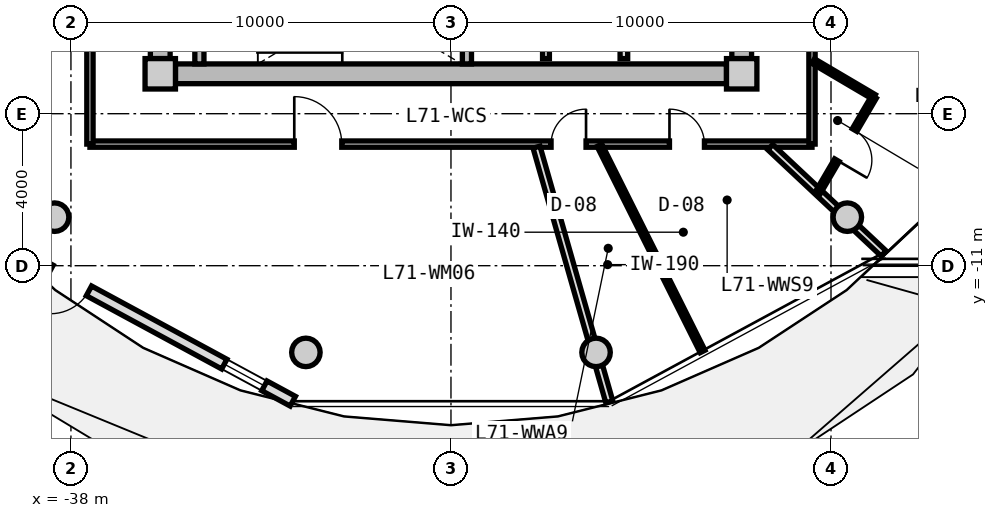
"""IFC4 building model, lengths in metres.
Left out: names, types, materials, properties, quantities, classifications, styles, units other than length and angle.
Written with IfcOpenShell. Run it as: python <this file> out.ifc"""

import sys

from ifc_helpers import new_model, si_unit, direction, frame, frame_2d, origin, origin_2d, place, context, subcontext, project, spatial, rectangle, circle, extrude, source, transform, mapped, element, fill, save


model = new_model("IFC4")
c1 = context("Model", 3, precision=1e-05, world=origin(), true_north=direction((0.0, 1.0)))
c2 = subcontext(c1, "Body", "Model", "MODEL_VIEW")
j1 = project(units=[si_unit("LENGTHUNIT", "METRE"), si_unit("PLANEANGLEUNIT", "RADIAN")], contexts=[c1])
p1 = place(None, origin())
s1 = spatial("IfcSite", under=j1, at=p1, CompositionType="ELEMENT")
p2 = place(p1, origin())
s2 = spatial("IfcBuilding", under=s1, at=p2, CompositionType="ELEMENT")
p3 = place(p2, frame((0.0, 0.0, 229.15)))
s3 = spatial("IfcBuildingStorey", under=s2, at=p3, CompositionType="ELEMENT", Elevation=229.15)
m1 = source(origin(), c2, "Body", "SweptSolid", [
    extrude(rectangle(XDim=0.8, YDim=0.8, at=origin_2d()), origin(), (0.0, 0.0, 1.0), 3.05),
])
for number, where, z_axis, x_axis in (
    (1, (-35.65, -5.95, 0.0), (0.0, 0.0, 1.0), (1.0, 0.0, 0.0)),
    (2, (-20.35, -5.95, 0.0), (0.0, 0.0, 1.0), (1.0, 0.0, 0.0)),
):
    element("IfcColumn", number, at=place(p3, frame(where, z_axis=z_axis, x_axis=x_axis)), inside=s3, PredefinedType="COLUMN", context=c2, shape_type="MappedRepresentation", body=[
        mapped(m1, transform((0.0, 0.0, 0.0), x_axis=(1.0, 0.0, 0.0), y_axis=(0.0, 1.0, 0.0), z_axis=(0.0, 0.0, 1.0), scale=1.0)),
    ])
m2 = source(origin(), c2, "Body", "SweptSolid", [
    extrude(rectangle(XDim=14.5, YDim=0.52, at=frame_2d((7.25, 0.0))), origin(), (0.0, 0.0, 1.0), 2.81),
])
p4 = place(p3, frame((-20.75, -5.95, 0.0), z_axis=(0.0, 0.0, 1.0), x_axis=(-1.0, 0.0, 0.0)))
e3 = element("IfcWall", 3, at=p4, inside=s3, PredefinedType="SHEAR", context=c2, shape_type="MappedRepresentation", body=[
    mapped(m2, transform((0.0, 0.0, 0.0), x_axis=(1.0, 0.0, 0.0), y_axis=(0.0, 1.0, 0.0), z_axis=(0.0, 0.0, 1.0), scale=1.0)),
])
m3 = source(origin(), c2, "Body", "SweptSolid", [
    extrude(rectangle(XDim=11.1, YDim=0.52, at=frame_2d((5.55, 0.0))), origin(), (0.0, 0.0, 1.0), 2.81),
])
p5 = place(p3, frame((-35.65, -5.55, 0.0), z_axis=(0.0, 0.0, 1.0), x_axis=(0.0, 1.0, 0.0)))
e4 = element("IfcWall", 4, at=p5, inside=s3, PredefinedType="SHEAR", context=c2, shape_type="MappedRepresentation", body=[
    mapped(m3, transform((0.0, 0.0, 0.0), x_axis=(1.0, 0.0, 0.0), y_axis=(0.0, 1.0, 0.0), z_axis=(0.0, 0.0, 1.0), scale=1.0)),
])
p6 = place(p5, frame((3.8, 0.0, 0.0)))
e5 = element("IfcOpeningElement", 5, at=p6, cuts=e4, PredefinedType="OPENING", context=c2, shape_type="SweptSolid", body=[
    extrude(rectangle(XDim=1.2, YDim=2.15, at=frame_2d((0.6, 1.075))), frame((0.0, 0.27, 0.0), z_axis=(0.0, -1.0, 0.0), x_axis=(1.0, 0.0, 0.0)), (0.0, 0.0, 1.0), 0.54),
])
p7 = place(p3, frame((-20.35, 5.55, 0.0), z_axis=(0.0, 0.0, 1.0), x_axis=(0.0, -1.0, 0.0)))
e6 = element("IfcWall", 6, at=p7, inside=s3, PredefinedType="SHEAR", context=c2, shape_type="MappedRepresentation", body=[
    mapped(m3, transform((0.0, 0.0, 0.0), x_axis=(1.0, 0.0, 0.0), y_axis=(0.0, 1.0, 0.0), z_axis=(0.0, 0.0, 1.0), scale=1.0)),
])
p8 = place(p7, frame((5.65, 0.0, 0.0)))
e7 = element("IfcOpeningElement", 7, at=p8, cuts=e6, PredefinedType="OPENING", context=c2, shape_type="SweptSolid", body=[
    extrude(rectangle(XDim=1.2, YDim=2.15, at=frame_2d((0.6, 1.075))), frame((0.0, 0.27, 0.0), z_axis=(0.0, -1.0, 0.0), x_axis=(1.0, 0.0, 0.0)), (0.0, 0.0, 1.0), 0.54),
])
p9 = place(p7, frame((9.3, 0.0, 0.0)))
e8 = element("IfcOpeningElement", 8, at=p9, cuts=e6, PredefinedType="OPENING", context=c2, shape_type="SweptSolid", body=[
    extrude(rectangle(XDim=1.0, YDim=2.1, at=frame_2d((0.5, 1.05))), frame((0.0, 0.27, 0.0), z_axis=(0.0, -1.0, 0.0), x_axis=(1.0, 0.0, 0.0)), (0.0, 0.0, 1.0), 0.54),
])
m4 = source(origin(), c2, "Body", "SweptSolid", [
    extrude(circle(Radius=0.375, at=origin_2d()), origin(), (0.0, 0.0, 1.0), 3.05),
])
for number, where, z_axis, x_axis in (
    (9, (-38.43, -9.723, 0.0), (0.0, 0.0, 1.0), (1.0, 0.0, 0.0)),
    (10, (-31.818, -13.281, 0.0), (0.0, 0.0, 1.0), (1.0, 0.0, 0.0)),
    (11, (-24.182, -13.281, 0.0), (0.0, 0.0, 1.0), (1.0, 0.0, 0.0)),
    (12, (-17.57, -9.723, 0.0), (0.0, 0.0, 1.0), (1.0, 0.0, 0.0)),
):
    element("IfcColumn", number, at=place(p3, frame(where, z_axis=z_axis, x_axis=x_axis)), inside=s3, PredefinedType="COLUMN", context=c2, shape_type="MappedRepresentation", body=[
        mapped(m4, transform((0.0, 0.0, 0.0), x_axis=(1.0, 0.0, 0.0), y_axis=(0.0, 1.0, 0.0), z_axis=(0.0, 0.0, 1.0), scale=1.0)),
    ])
m5 = source(origin(), c2, "Body", "SweptSolid", [
    extrude(rectangle(XDim=8.197, YDim=0.29, at=frame_2d((4.099, 0.0))), origin(), (0.0, 0.0, 1.0), 2.81),
])
p10 = place(p3, frame((-32.162, -14.566, 0.0), z_axis=(0.0, 0.0, 1.0), x_axis=(-0.879369910001, 0.476139224791, 0.0)))
e13 = element("IfcWall", 13, at=p10, inside=s3, PredefinedType="SOLIDWALL", context=c2, shape_type="MappedRepresentation", body=[
    mapped(m5, transform((0.0, 0.0, 0.0), x_axis=(1.0, 0.0, 0.0), y_axis=(0.0, 1.0, 0.0), z_axis=(0.0, 0.0, 1.0), scale=1.0)),
])
p11 = place(p10, frame((6.1, 0.0, 0.0)))
e14 = element("IfcOpeningElement", 14, at=p11, cuts=e13, PredefinedType="OPENING", context=c2, shape_type="SweptSolid", body=[
    extrude(rectangle(XDim=1.15, YDim=2.25, at=frame_2d((0.575, 1.125))), frame((0.0, 0.155, 0.0), z_axis=(0.0, -1.0, 0.0), x_axis=(1.0, 0.0, 0.0)), (0.0, 0.0, 1.0), 0.31),
])
p12 = place(p10, frame((0.85, 0.0, 0.85)))
e15 = element("IfcOpeningElement", 15, at=p12, cuts=e13, PredefinedType="OPENING", context=c2, shape_type="SweptSolid", body=[
    extrude(rectangle(XDim=1.2, YDim=1.5, at=frame_2d((0.6, 0.75))), frame((0.0, 0.155, 0.0), z_axis=(0.0, -1.0, 0.0), x_axis=(1.0, 0.0, 0.0)), (0.0, 0.0, 1.0), 0.31),
])
m6 = source(origin(), c2, "Body", "SweptSolid", [
    extrude(rectangle(XDim=3.24, YDim=0.24, at=frame_2d((1.62, 0.0))), origin(), (0.0, 0.0, 1.0), 2.81),
])
for number, where, z_axis, x_axis in (
    (16, (-34.62, -5.69, 0.0), (0.0, 0.0, 1.0), (0.0, 1.0, 0.0)),
    (17, (-27.58, -5.69, 0.0), (0.0, 0.0, 1.0), (0.0, 1.0, 0.0)),
):
    element("IfcWall", number, at=place(p3, frame(where, z_axis=z_axis, x_axis=x_axis)), inside=s3, PredefinedType="PARTITIONING", context=c2, shape_type="MappedRepresentation", body=[
        mapped(m6, transform((0.0, 0.0, 0.0), x_axis=(1.0, 0.0, 0.0), y_axis=(0.0, 1.0, 0.0), z_axis=(0.0, 0.0, 1.0), scale=1.0)),
    ])
m7 = source(origin(), c2, "Body", "SweptSolid", [
    extrude(rectangle(XDim=3.8, YDim=0.2, at=frame_2d((1.9, 0.0))), origin(), (0.0, 0.0, 1.0), 2.795),
])
p13 = place(p3, frame((-23.45, -5.55, 0.0), z_axis=(0.0, 0.0, 1.0), x_axis=(0.0, 1.0, 0.0)))
e18 = element("IfcWall", 18, at=p13, inside=s3, PredefinedType="PARTITIONING", context=c2, shape_type="MappedRepresentation", body=[
    mapped(m7, transform((0.0, 0.0, 0.0), x_axis=(1.0, 0.0, 0.0), y_axis=(0.0, 1.0, 0.0), z_axis=(0.0, 0.0, 1.0), scale=1.0)),
])
m8 = source(origin(), c2, "Body", "SweptSolid", [
    extrude(rectangle(XDim=4.2, YDim=0.18, at=frame_2d((2.1, 0.0))), origin(), (0.0, 0.0, 1.0), 2.795),
])
p14 = place(p3, frame((-25.5, -5.55, 0.0), z_axis=(0.0, 0.0, 1.0), x_axis=(0.0, 1.0, 0.0)))
e19 = element("IfcWall", 19, at=p14, inside=s3, PredefinedType="PARTITIONING", context=c2, shape_type="MappedRepresentation", body=[
    mapped(m8, transform((0.0, 0.0, 0.0), x_axis=(1.0, 0.0, 0.0), y_axis=(0.0, 1.0, 0.0), z_axis=(0.0, 0.0, 1.0), scale=1.0)),
])
m9 = source(origin(), c2, "Body", "SweptSolid", [
    extrude(rectangle(XDim=19.0, YDim=0.165, at=frame_2d((9.5, 0.0))), origin(), (0.0, 0.0, 1.0), 2.795),
])
p15 = place(p3, frame((-18.5, -7.8, 0.0), z_axis=(0.0, 0.0, 1.0), x_axis=(-1.0, 0.0, 0.0)))
e20 = element("IfcWall", 20, at=p15, inside=s3, PredefinedType="PARTITIONING", context=c2, shape_type="MappedRepresentation", body=[
    mapped(m9, transform((0.0, 0.0, 0.0), x_axis=(1.0, 0.0, 0.0), y_axis=(0.0, 1.0, 0.0), z_axis=(0.0, 0.0, 1.0), scale=1.0)),
])
p16 = place(p15, frame((12.373, 0.0, 0.0)))
e21 = element("IfcOpeningElement", 21, at=p16, cuts=e20, PredefinedType="OPENING", context=c2, shape_type="SweptSolid", body=[
    extrude(rectangle(XDim=1.25, YDim=2.2, at=frame_2d((0.625, 1.1))), frame((0.0, 0.093, 0.0), z_axis=(0.0, -1.0, 0.0), x_axis=(1.0, 0.0, 0.0)), (0.0, 0.0, 1.0), 0.185),
])
p17 = place(p15, frame((5.946, 0.0, 0.0)))
e22 = element("IfcOpeningElement", 22, at=p17, cuts=e20, PredefinedType="OPENING", context=c2, shape_type="SweptSolid", body=[
    extrude(rectangle(XDim=0.92, YDim=2.1, at=frame_2d((0.46, 1.05))), frame((0.0, 0.093, 0.0), z_axis=(0.0, -1.0, 0.0), x_axis=(1.0, 0.0, 0.0)), (0.0, 0.0, 1.0), 0.185),
])
p18 = place(p15, frame((2.83, 0.0, 0.0)))
e23 = element("IfcOpeningElement", 23, at=p18, cuts=e20, PredefinedType="OPENING", context=c2, shape_type="SweptSolid", body=[
    extrude(rectangle(XDim=0.92, YDim=2.1, at=frame_2d((0.46, 1.05))), frame((0.0, 0.093, 0.0), z_axis=(0.0, -1.0, 0.0), x_axis=(1.0, 0.0, 0.0)), (0.0, 0.0, 1.0), 0.185),
])
m10 = source(origin(), c2, "Body", "SweptSolid", [
    extrude(rectangle(XDim=6.88, YDim=0.165, at=frame_2d((3.44, 0.0))), origin(), (0.0, 0.0, 1.0), 2.795),
])
p19 = place(p3, frame((-37.5, -7.8, 0.0), z_axis=(0.0, 0.0, 1.0), x_axis=(0.0, 1.0, 0.0)))
e24 = element("IfcWall", 24, at=p19, inside=s3, PredefinedType="PARTITIONING", context=c2, shape_type="MappedRepresentation", body=[
    mapped(m10, transform((0.0, 0.0, 0.0), x_axis=(1.0, 0.0, 0.0), y_axis=(0.0, 1.0, 0.0), z_axis=(0.0, 0.0, 1.0), scale=1.0)),
])
p20 = place(p3, frame((-18.5, -0.92, 0.0), z_axis=(0.0, 0.0, 1.0), x_axis=(0.0, -1.0, 0.0)))
e25 = element("IfcWall", 25, at=p20, inside=s3, PredefinedType="PARTITIONING", context=c2, shape_type="MappedRepresentation", body=[
    mapped(m10, transform((0.0, 0.0, 0.0), x_axis=(1.0, 0.0, 0.0), y_axis=(0.0, 1.0, 0.0), z_axis=(0.0, 0.0, 1.0), scale=1.0)),
])
p21 = place(p20, frame((2.486, 0.0, 0.0)))
e26 = element("IfcOpeningElement", 26, at=p21, cuts=e25, PredefinedType="OPENING", context=c2, shape_type="SweptSolid", body=[
    extrude(rectangle(XDim=1.25, YDim=2.2, at=frame_2d((0.625, 1.1))), frame((0.0, 0.093, 0.0), z_axis=(0.0, -1.0, 0.0), x_axis=(1.0, 0.0, 0.0)), (0.0, 0.0, 1.0), 0.185),
])
m11 = source(origin(), c2, "Body", "SweptSolid", [
    extrude(rectangle(XDim=6.974, YDim=0.19, at=frame_2d((3.487, 0.0))), origin(), (0.0, 0.0, 1.0), 2.395),
])
p22 = place(p3, frame((-25.749, -7.88, 0.0), z_axis=(0.0, 0.0, 1.0), x_axis=(0.274707256801, -0.961527910703, 0.0)))
e27 = element("IfcWall", 27, at=p22, inside=s3, PredefinedType="PARTITIONING", context=c2, shape_type="MappedRepresentation", body=[
    mapped(m11, transform((0.0, 0.0, 0.0), x_axis=(1.0, 0.0, 0.0), y_axis=(0.0, 1.0, 0.0), z_axis=(0.0, 0.0, 1.0), scale=1.0)),
])
m12 = source(origin(), c2, "Body", "SweptSolid", [
    extrude(rectangle(XDim=4.089, YDim=0.19, at=frame_2d((2.044, 0.0))), origin(), (0.0, 0.0, 1.0), 2.395),
])
p23 = place(p3, frame((-19.598, -7.88, 0.0), z_axis=(0.0, 0.0, 1.0), x_axis=(0.729401273609, -0.684086092577, 0.0)))
e28 = element("IfcWall", 28, at=p23, inside=s3, PredefinedType="PARTITIONING", context=c2, shape_type="MappedRepresentation", body=[
    mapped(m12, transform((0.0, 0.0, 0.0), x_axis=(1.0, 0.0, 0.0), y_axis=(0.0, 1.0, 0.0), z_axis=(0.0, 0.0, 1.0), scale=1.0)),
])
m13 = source(origin(), c2, "Body", "SweptSolid", [
    extrude(rectangle(XDim=6.067, YDim=0.14, at=frame_2d((3.034, 0.0))), origin(), (0.0, 0.0, 1.0), 2.795),
])
p24 = place(p3, frame((-24.093, -7.83, 0.0), z_axis=(0.0, 0.0, 1.0), x_axis=(0.447261882231, -0.894403046005, 0.0)))
e29 = element("IfcWall", 29, at=p24, inside=s3, PredefinedType="PARTITIONING", context=c2, shape_type="MappedRepresentation", body=[
    mapped(m13, transform((0.0, 0.0, 0.0), x_axis=(1.0, 0.0, 0.0), y_axis=(0.0, 1.0, 0.0), z_axis=(0.0, 0.0, 1.0), scale=1.0)),
])
m14 = source(origin(), c2, "Body", "SweptSolid", [
    extrude(rectangle(XDim=1.859, YDim=0.14, at=frame_2d((0.93, 0.0))), origin(), (0.0, 0.0, 1.0), 2.795),
])
p25 = place(p3, frame((-18.47, -5.615, 0.0), z_axis=(0.0, 0.0, 1.0), x_axis=(0.861555897139, -0.507662718845, 0.0)))
e30 = element("IfcWall", 30, at=p25, inside=s3, PredefinedType="PARTITIONING", context=c2, shape_type="MappedRepresentation", body=[
    mapped(m14, transform((0.0, 0.0, 0.0), x_axis=(1.0, 0.0, 0.0), y_axis=(0.0, 1.0, 0.0), z_axis=(0.0, 0.0, 1.0), scale=1.0)),
])
m15 = source(origin(), c2, "Body", "SweptSolid", [
    extrude(rectangle(XDim=2.939, YDim=0.14, at=frame_2d((1.47, 0.0))), origin(), (0.0, 0.0, 1.0), 2.795),
])
p26 = place(p3, frame((-16.868, -6.559, 0.0), z_axis=(0.0, 0.0, 1.0), x_axis=(-0.505883614636, -0.862601743821, 0.0)))
e31 = element("IfcWall", 31, at=p26, inside=s3, PredefinedType="PARTITIONING", context=c2, shape_type="MappedRepresentation", body=[
    mapped(m15, transform((0.0, 0.0, 0.0), x_axis=(1.0, 0.0, 0.0), y_axis=(0.0, 1.0, 0.0), z_axis=(0.0, 0.0, 1.0), scale=1.0)),
])
p27 = place(p26, frame((1.01, 0.0, 0.0)))
e32 = element("IfcOpeningElement", 32, at=p27, cuts=e31, PredefinedType="OPENING", context=c2, shape_type="SweptSolid", body=[
    extrude(rectangle(XDim=0.92, YDim=2.1, at=frame_2d((0.46, 1.05))), frame((0.0, 0.08, 0.0), z_axis=(0.0, -1.0, 0.0), x_axis=(1.0, 0.0, 0.0)), (0.0, 0.0, 1.0), 0.16),
])
m16 = source(origin(), c2, "Body", "SweptSolid", [
    extrude(rectangle(XDim=1.15, YDim=2.25, at=frame_2d((0.575, 1.125))), frame((0.0, 0.025, 0.0), z_axis=(0.0, -1.0, 0.0), x_axis=(1.0, 0.0, 0.0)), (0.0, 0.0, 1.0), 0.05),
])
p28 = place(p11, origin())
e33 = element("IfcDoor", 33, at=p28, inside=s3, OperationType="SINGLE_SWING_RIGHT", PredefinedType="DOOR", context=c2, shape_type="MappedRepresentation", body=[
    mapped(m16, transform((0.0, 0.0, 0.0), x_axis=(1.0, 0.0, 0.0), y_axis=(0.0, 1.0, 0.0), z_axis=(0.0, 0.0, 1.0), scale=1.0)),
])
fill(e14, e33)
m17 = source(origin(), c2, "Body", "SweptSolid", [
    extrude(rectangle(XDim=1.2, YDim=1.5, at=frame_2d((0.6, 0.75))), frame((0.0, 0.03, 0.0), z_axis=(0.0, -1.0, 0.0), x_axis=(1.0, 0.0, 0.0)), (0.0, 0.0, 1.0), 0.06),
])
p29 = place(p12, origin())
e34 = element("IfcWindow", 34, at=p29, inside=s3, PartitioningType="SINGLE_PANEL", PredefinedType="WINDOW", context=c2, shape_type="MappedRepresentation", body=[
    mapped(m17, transform((0.0, 0.0, 0.0), x_axis=(1.0, 0.0, 0.0), y_axis=(0.0, 1.0, 0.0), z_axis=(0.0, 0.0, 1.0), scale=1.0)),
])
fill(e15, e34)
m18 = source(origin(), c2, "Body", "SweptSolid", [
    extrude(rectangle(XDim=1.25, YDim=2.2, at=frame_2d((0.625, 1.1))), frame((0.0, 0.025, 0.0), z_axis=(0.0, -1.0, 0.0), x_axis=(1.0, 0.0, 0.0)), (0.0, 0.0, 1.0), 0.05),
])
p30 = place(p16, frame((1.25, 0.0, 0.0), z_axis=(0.0, 0.0, 1.0), x_axis=(-1.0, 0.0, 0.0)))
e35 = element("IfcDoor", 35, at=p30, inside=s3, OperationType="SINGLE_SWING_LEFT", PredefinedType="DOOR", context=c2, shape_type="MappedRepresentation", body=[
    mapped(m18, transform((0.0, 0.0, 0.0), x_axis=(1.0, 0.0, 0.0), y_axis=(0.0, 1.0, 0.0), z_axis=(0.0, 0.0, 1.0), scale=1.0)),
])
fill(e21, e35)
m19 = source(origin(), c2, "Body", "SweptSolid", [
    extrude(rectangle(XDim=0.92, YDim=2.1, at=frame_2d((0.46, 1.05))), frame((0.0, 0.025, 0.0), z_axis=(0.0, -1.0, 0.0), x_axis=(1.0, 0.0, 0.0)), (0.0, 0.0, 1.0), 0.05),
])
p31 = place(p17, frame((0.92, 0.0, 0.0), z_axis=(0.0, 0.0, 1.0), x_axis=(-1.0, 0.0, 0.0)))
e36 = element("IfcDoor", 36, at=p31, inside=s3, OperationType="SINGLE_SWING_RIGHT", PredefinedType="DOOR", context=c2, shape_type="MappedRepresentation", body=[
    mapped(m19, transform((0.0, 0.0, 0.0), x_axis=(1.0, 0.0, 0.0), y_axis=(0.0, 1.0, 0.0), z_axis=(0.0, 0.0, 1.0), scale=1.0)),
])
fill(e22, e36)
p32 = place(p18, frame((0.92, 0.0, 0.0), z_axis=(0.0, 0.0, 1.0), x_axis=(-1.0, 0.0, 0.0)))
e37 = element("IfcDoor", 37, at=p32, inside=s3, OperationType="SINGLE_SWING_LEFT", PredefinedType="DOOR", context=c2, shape_type="MappedRepresentation", body=[
    mapped(m19, transform((0.0, 0.0, 0.0), x_axis=(1.0, 0.0, 0.0), y_axis=(0.0, 1.0, 0.0), z_axis=(0.0, 0.0, 1.0), scale=1.0)),
])
fill(e23, e37)
p33 = place(p27, origin())
e38 = element("IfcDoor", 38, at=p33, inside=s3, OperationType="SINGLE_SWING_RIGHT", PredefinedType="DOOR", context=c2, shape_type="MappedRepresentation", body=[
    mapped(m19, transform((0.0, 0.0, 0.0), x_axis=(1.0, 0.0, 0.0), y_axis=(0.0, 1.0, 0.0), z_axis=(0.0, 0.0, 1.0), scale=1.0)),
])
fill(e32, e38)
save(model, sys.argv[1])
